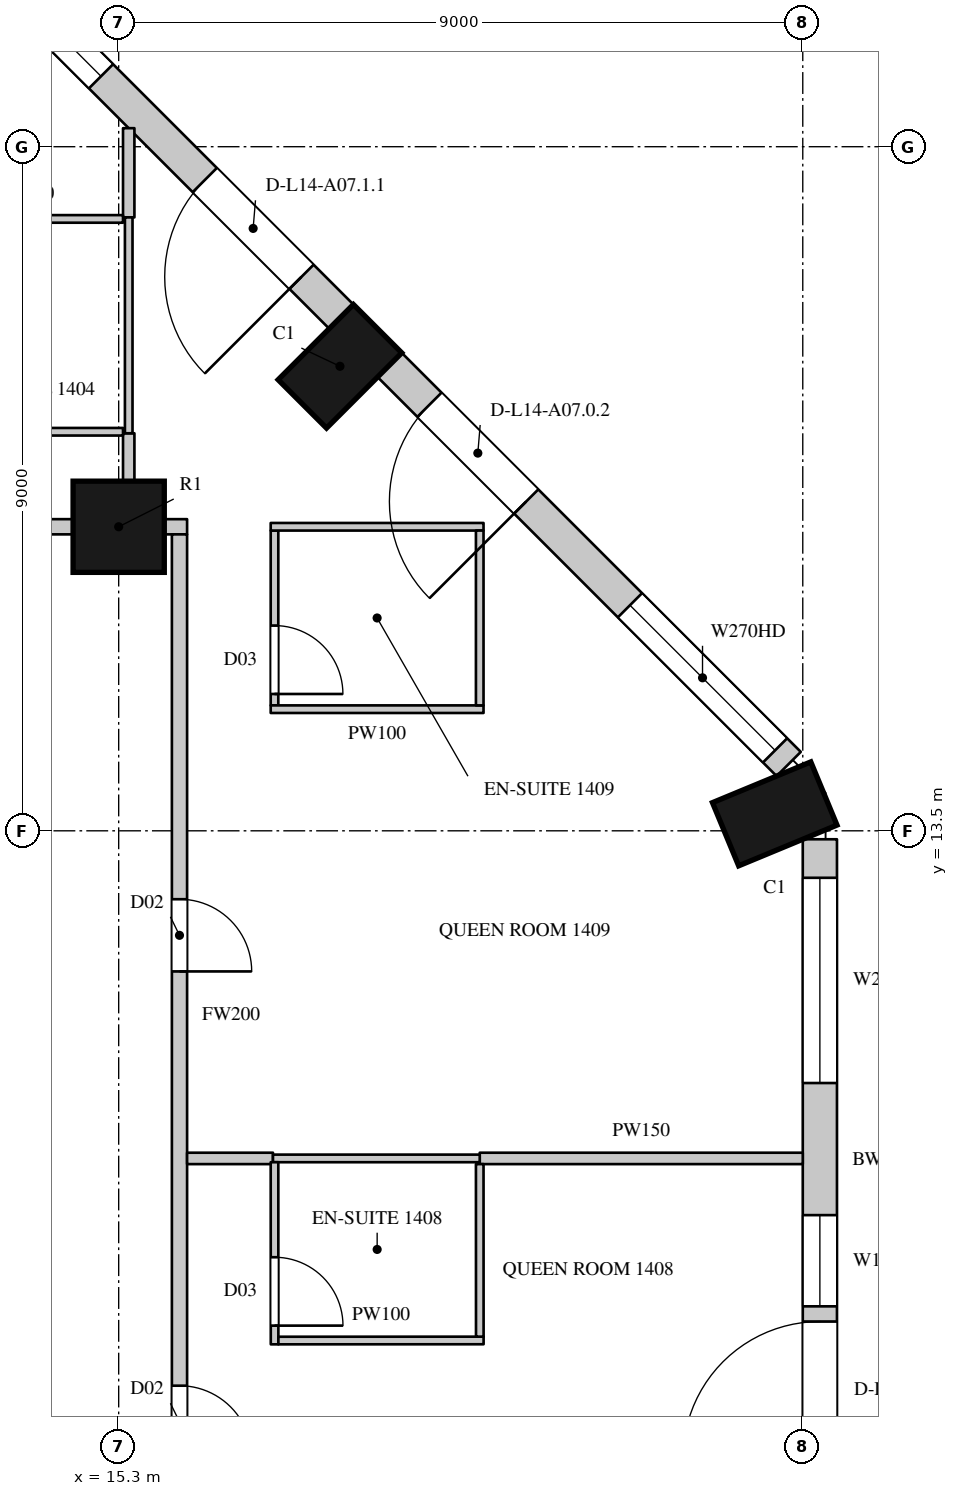
"""IFC4 building model, lengths in metres.
Left out: names, types, materials, properties, quantities, classifications, styles, units other than length and angle.
Written with IfcOpenShell. Run it as: python <this file> out.ifc"""

import sys

from ifc_helpers import new_model, si_unit, direction, frame, frame_2d, origin, origin_2d, place, context, subcontext, project, spatial, rectangle, circle, extrude, element, fill, save


model = new_model("IFC4")
c1 = context("Model", 3, precision=1e-05, world=origin(), true_north=direction((0.0, 1.0)))
c2 = subcontext(c1, "Body", "Model", "MODEL_VIEW")
j1 = project(units=[si_unit("LENGTHUNIT", "METRE"), si_unit("PLANEANGLEUNIT", "RADIAN")], contexts=[c1])
p1 = place(None, origin())
s1 = spatial("IfcSite", under=j1, at=p1, CompositionType="ELEMENT")
p2 = place(p1, origin())
s2 = spatial("IfcBuilding", under=s1, at=p2, CompositionType="ELEMENT")
p3 = place(p2, frame((0.0, 0.0, 80.7)))
s3 = spatial("IfcBuildingStorey", under=s2, at=p3, CompositionType="ELEMENT", Elevation=80.7)
for number, where, z_axis, x_axis in (
    (1, (23.931, 13.723, 0.0), (0.0, 0.0, 1.0), (-0.383, 0.924, 0.0)),
    (2, (18.211, 19.611, 0.0), (0.0, 0.0, 1.0), (-0.707, 0.707, 0.0)),
):
    element("IfcColumn", number, at=place(p3, frame(where, z_axis=z_axis, x_axis=x_axis)), inside=s3, PredefinedType="COLUMN", context=c2, shape_type="SweptSolid", body=[
        extrude(rectangle(XDim=0.9, YDim=1.4, at=origin_2d()), origin(), (0.0, 0.0, 1.0), 3.6),
    ])
p4 = place(p3, frame((15.3, 17.5, 0.0), z_axis=(0.0, 0.0, 1.0), x_axis=(1.0, 0.0, 0.0)))
e3 = element("IfcColumn", 3, at=p4, inside=s3, PredefinedType="COLUMN", context=c2, shape_type="SweptSolid", body=[
    extrude(circle(Radius=0.6, at=origin_2d()), origin(), (0.0, 0.0, 1.0), 3.6),
])
p5 = place(p3, frame((24.525, 4.95, 0.0), z_axis=(0.0, 0.0, 1.0), x_axis=(0.0, 1.0, 0.0)))
e4 = element("IfcWall", 4, at=p5, inside=s3, PredefinedType="SOLIDWALL", context=c2, shape_type="SweptSolid", body=[
    extrude(rectangle(XDim=8.439, YDim=0.45, at=frame_2d((4.219, 0.0))), origin(), (0.0, 0.0, 1.0), 3.3),
])
p6 = place(p5, frame((0.294, 0.0, 0.0)))
e5 = element("IfcOpeningElement", 5, at=p6, cuts=e4, PredefinedType="OPENING", context=c2, shape_type="SweptSolid", body=[
    extrude(rectangle(XDim=1.8, YDim=2.4, at=frame_2d((0.9, 1.2))), frame((0.0, 0.235, 0.0), z_axis=(0.0, -1.0, 0.0), x_axis=(1.0, 0.0, 0.0)), (0.0, 0.0, 1.0), 0.47),
])
p7 = place(p5, frame((2.294, 0.0, 1.05)))
e6 = element("IfcOpeningElement", 6, at=p7, cuts=e4, PredefinedType="OPENING", context=c2, shape_type="SweptSolid", body=[
    extrude(rectangle(XDim=1.2, YDim=2.0, at=frame_2d((0.6, 1.0))), frame((0.0, 0.235, 0.0), z_axis=(0.0, -1.0, 0.0), x_axis=(1.0, 0.0, 0.0)), (0.0, 0.0, 1.0), 0.47),
])
p8 = place(p5, frame((5.232, 0.0, 1.05)))
e7 = element("IfcOpeningElement", 7, at=p8, cuts=e4, PredefinedType="OPENING", context=c2, shape_type="SweptSolid", body=[
    extrude(rectangle(XDim=2.7, YDim=2.0, at=frame_2d((1.35, 1.0))), frame((0.0, 0.235, 0.0), z_axis=(0.0, -1.0, 0.0), x_axis=(1.0, 0.0, 0.0)), (0.0, 0.0, 1.0), 0.47),
])
p9 = place(p3, frame((24.115, 14.379, 0.0), z_axis=(0.0, 0.0, 1.0), x_axis=(-0.707106781187, 0.707106781187, 0.0)))
e8 = element("IfcWall", 8, at=p9, inside=s3, PredefinedType="SOLIDWALL", context=c2, shape_type="SweptSolid", body=[
    extrude(rectangle(XDim=7.424, YDim=0.45, at=frame_2d((3.712, 0.0))), origin(), (0.0, 0.0, 1.0), 3.3),
])
p10 = place(p9, frame((0.253, 0.0, 1.05)))
e9 = element("IfcOpeningElement", 9, at=p10, cuts=e8, PredefinedType="OPENING", context=c2, shape_type="SweptSolid", body=[
    extrude(rectangle(XDim=2.7, YDim=2.0, at=frame_2d((1.35, 1.0))), frame((0.0, 0.235, 0.0), z_axis=(0.0, -1.0, 0.0), x_axis=(1.0, 0.0, 0.0)), (0.0, 0.0, 1.0), 0.47),
])
p11 = place(p9, frame((4.884, 0.0, 0.0)))
e10 = element("IfcOpeningElement", 10, at=p11, cuts=e8, PredefinedType="OPENING", context=c2, shape_type="SweptSolid", body=[
    extrude(rectangle(XDim=1.8, YDim=2.4, at=frame_2d((0.9, 1.2))), frame((0.0, 0.235, 0.0), z_axis=(0.0, -1.0, 0.0), x_axis=(1.0, 0.0, 0.0)), (0.0, 0.0, 1.0), 0.47),
])
p12 = place(p3, frame((18.229, 20.265, 0.0), z_axis=(0.0, 0.0, 1.0), x_axis=(-0.707106781187, 0.707106781187, 0.0)))
e11 = element("IfcWall", 11, at=p12, inside=s3, PredefinedType="SOLIDWALL", context=c2, shape_type="SweptSolid", body=[
    extrude(rectangle(XDim=7.424, YDim=0.45, at=frame_2d((3.712, 0.0))), origin(), (0.0, 0.0, 1.0), 3.3),
])
p13 = place(p12, frame((0.74, 0.0, 0.0)))
e12 = element("IfcOpeningElement", 12, at=p13, cuts=e11, PredefinedType="OPENING", context=c2, shape_type="SweptSolid", body=[
    extrude(rectangle(XDim=1.8, YDim=2.4, at=frame_2d((0.9, 1.2))), frame((0.0, 0.235, 0.0), z_axis=(0.0, -1.0, 0.0), x_axis=(1.0, 0.0, 0.0)), (0.0, 0.0, 1.0), 0.47),
])
p14 = place(p12, frame((4.471, 0.0, 1.05)))
e13 = element("IfcOpeningElement", 13, at=p14, cuts=e11, PredefinedType="OPENING", context=c2, shape_type="SweptSolid", body=[
    extrude(rectangle(XDim=2.7, YDim=2.0, at=frame_2d((1.35, 1.0))), frame((0.0, 0.235, 0.0), z_axis=(0.0, -1.0, 0.0), x_axis=(1.0, 0.0, 0.0)), (0.0, 0.0, 1.0), 0.47),
])
p15 = place(p3, frame((23.15, 16.864, 0.0), z_axis=(0.0, 0.0, 1.0), x_axis=(-0.707106781187, 0.707106781187, 0.0)))
e14 = element("IfcWall", 14, at=p15, inside=s3, PredefinedType="SOLIDWALL", context=c2, shape_type="SweptSolid", body=[
    extrude(rectangle(XDim=1.445, YDim=0.45, at=frame_2d((0.722, 0.0))), origin(), (0.0, 0.0, 1.0), 0.6),
])
p16 = place(p3, frame((19.937, 20.078, 0.0), z_axis=(0.0, 0.0, 1.0), x_axis=(-0.707106781187, 0.707106781187, 0.0)))
e15 = element("IfcWall", 15, at=p16, inside=s3, PredefinedType="SOLIDWALL", context=c2, shape_type="SweptSolid", body=[
    extrude(rectangle(XDim=1.781, YDim=0.45, at=frame_2d((0.89, 0.0))), origin(), (0.0, 0.0, 1.0), 0.6),
])
p17 = place(p3, frame((16.486, 23.529, 0.0), z_axis=(0.0, 0.0, 1.0), x_axis=(-0.707022305137, 0.707191247145, 0.0)))
e16 = element("IfcWall", 16, at=p17, inside=s3, PredefinedType="SOLIDWALL", context=c2, shape_type="SweptSolid", body=[
    extrude(rectangle(XDim=1.445, YDim=0.45, at=frame_2d((0.723, 0.0))), origin(), (0.0, 0.0, 1.0), 0.6),
])
p18 = place(p3, frame((6.9, 17.5, 0.0), z_axis=(0.0, 0.0, 1.0), x_axis=(1.0, 0.0, 0.0)))
e17 = element("IfcWall", 17, at=p18, inside=s3, PredefinedType="PARTITIONING", context=c2, shape_type="SweptSolid", body=[
    extrude(rectangle(XDim=7.8, YDim=0.2, at=frame_2d((3.9, 0.0))), origin(), (0.0, 0.0, 1.0), 2.75),
])
p19 = place(p18, frame((1.45, 0.0, 0.0)))
e18 = element("IfcOpeningElement", 18, at=p19, cuts=e17, PredefinedType="OPENING", context=c2, shape_type="SweptSolid", body=[
    extrude(rectangle(XDim=1.1, YDim=2.4, at=frame_2d((0.55, 1.2))), frame((0.0, 0.11, 0.0), z_axis=(0.0, -1.0, 0.0), x_axis=(1.0, 0.0, 0.0)), (0.0, 0.0, 1.0), 0.22),
])
p20 = place(p3, frame((15.9, 17.5, 0.0), z_axis=(0.0, 0.0, 1.0), x_axis=(1.0, 0.0, 0.0)))
e19 = element("IfcWall", 19, at=p20, inside=s3, PredefinedType="PARTITIONING", context=c2, shape_type="SweptSolid", body=[
    extrude(rectangle(XDim=0.3, YDim=0.2, at=frame_2d((0.15, 0.0))), origin(), (0.0, 0.0, 1.0), 3.3),
])
p21 = place(p3, frame((16.1, 4.75, 0.0), z_axis=(0.0, 0.0, 1.0), x_axis=(0.0, 1.0, 0.0)))
e20 = element("IfcWall", 20, at=p21, inside=s3, PredefinedType="PARTITIONING", context=c2, shape_type="SweptSolid", body=[
    extrude(rectangle(XDim=12.65, YDim=0.2, at=frame_2d((6.325, 0.0))), origin(), (0.0, 0.0, 1.0), 3.3),
])
p22 = place(p21, frame((0.5, 0.0, 0.0)))
e21 = element("IfcOpeningElement", 21, at=p22, cuts=e20, PredefinedType="OPENING", context=c2, shape_type="SweptSolid", body=[
    extrude(rectangle(XDim=0.95, YDim=2.2, at=frame_2d((0.475, 1.1))), frame((0.0, 0.11, 0.0), z_axis=(0.0, -1.0, 0.0), x_axis=(1.0, 0.0, 0.0)), (0.0, 0.0, 1.0), 0.22),
])
p23 = place(p21, frame((6.9, 0.0, 0.0)))
e22 = element("IfcOpeningElement", 22, at=p23, cuts=e20, PredefinedType="OPENING", context=c2, shape_type="SweptSolid", body=[
    extrude(rectangle(XDim=0.95, YDim=2.2, at=frame_2d((0.475, 1.1))), frame((0.0, 0.11, 0.0), z_axis=(0.0, -1.0, 0.0), x_axis=(1.0, 0.0, 0.0)), (0.0, 0.0, 1.0), 0.22),
])
p24 = place(p3, frame((15.432, 18.094, 0.0), z_axis=(0.0, 0.0, 1.0), x_axis=(0.0, 1.0, 0.0)))
e23 = element("IfcWall", 23, at=p24, inside=s3, PredefinedType="PARTITIONING", context=c2, shape_type="SweptSolid", body=[
    extrude(rectangle(XDim=0.636, YDim=0.15, at=frame_2d((0.318, 0.0))), origin(), (0.0, 0.0, 1.0), 3.3),
])
p25 = place(p3, frame((15.432, 21.57, 0.0), z_axis=(0.0, 0.0, 1.0), x_axis=(0.0, 1.0, 0.0)))
e24 = element("IfcWall", 24, at=p25, inside=s3, PredefinedType="PARTITIONING", context=c2, shape_type="SweptSolid", body=[
    extrude(rectangle(XDim=1.174, YDim=0.15, at=frame_2d((0.587, 0.0))), origin(), (0.0, 0.0, 1.0), 3.3),
])
p26 = place(p3, frame((16.2, 9.19, 0.0), z_axis=(0.0, 0.0, 1.0), x_axis=(1.0, 0.0, 0.0)))
e25 = element("IfcWall", 25, at=p26, inside=s3, PredefinedType="PARTITIONING", context=c2, shape_type="SweptSolid", body=[
    extrude(rectangle(XDim=1.13, YDim=0.15, at=frame_2d((0.565, 0.0))), origin(), (0.0, 0.0, 1.0), 2.65),
])
p27 = place(p3, frame((20.05, 9.19, 0.0), z_axis=(0.0, 0.0, 1.0), x_axis=(1.0, 0.0, 0.0)))
e26 = element("IfcWall", 26, at=p27, inside=s3, PredefinedType="PARTITIONING", context=c2, shape_type="SweptSolid", body=[
    extrude(rectangle(XDim=4.25, YDim=0.15, at=frame_2d((2.125, 0.0))), origin(), (0.0, 0.0, 1.0), 2.65),
])
for number, where, z_axis, x_axis in (
    (27, (12.786, 18.75, 0.0), (0.0, 0.0, 1.0), (1.0, 0.0, 0.0)),
    (28, (12.786, 21.55, 0.0), (0.0, 0.0, 1.0), (1.0, 0.0, 0.0)),
):
    element("IfcWall", number, at=place(p3, frame(where, z_axis=z_axis, x_axis=x_axis)), inside=s3, PredefinedType="PARTITIONING", context=c2, shape_type="SweptSolid", body=[
        extrude(rectangle(XDim=2.571, YDim=0.1, at=frame_2d((1.286, 0.0))), origin(), (0.0, 0.0, 1.0), 3.3),
    ])
p28 = place(p3, frame((15.432, 18.73, 0.0), z_axis=(0.0, 0.0, 1.0), x_axis=(0.0, 1.0, 0.0)))
e29 = element("IfcWall", 29, at=p28, inside=s3, PredefinedType="PARTITIONING", context=c2, shape_type="SweptSolid", body=[
    extrude(rectangle(XDim=2.84, YDim=0.1, at=frame_2d((1.42, 0.0))), origin(), (0.0, 0.0, 1.0), 3.3),
])
p29 = place(p3, frame((17.33, 9.19, 0.0), z_axis=(0.0, 0.0, 1.0), x_axis=(1.0, 0.0, 0.0)))
e30 = element("IfcWall", 30, at=p29, inside=s3, PredefinedType="PARTITIONING", context=c2, shape_type="SweptSolid", body=[
    extrude(rectangle(XDim=2.72, YDim=0.1, at=frame_2d((1.36, 0.0))), origin(), (0.0, 0.0, 1.0), 2.65),
])
p30 = place(p3, frame((17.35, 9.14, 0.0), z_axis=(0.0, 0.0, 1.0), x_axis=(0.000407580973, -0.999999916939, 0.0)))
e31 = element("IfcWall", 31, at=p30, inside=s3, PredefinedType="PARTITIONING", context=c2, shape_type="SweptSolid", body=[
    extrude(rectangle(XDim=2.396, YDim=0.1, at=frame_2d((1.198, 0.0))), origin(), (0.0, 0.0, 1.0), 3.3),
])
p31 = place(p30, frame((1.25, 0.0, 0.0)))
e32 = element("IfcOpeningElement", 32, at=p31, cuts=e31, PredefinedType="OPENING", context=c2, shape_type="SweptSolid", body=[
    extrude(rectangle(XDim=0.9, YDim=2.2, at=frame_2d((0.45, 1.1))), frame((0.0, 0.06, 0.0), z_axis=(0.0, -1.0, 0.0), x_axis=(1.0, 0.0, 0.0)), (0.0, 0.0, 1.0), 0.12),
])
p32 = place(p3, frame((17.35, 15.15, 0.0), z_axis=(0.0, 0.0, 1.0), x_axis=(0.0, 1.0, 0.0)))
e33 = element("IfcWall", 33, at=p32, inside=s3, PredefinedType="PARTITIONING", context=c2, shape_type="SweptSolid", body=[
    extrude(rectangle(XDim=2.3, YDim=0.1, at=frame_2d((1.15, 0.0))), origin(), (0.0, 0.0, 1.0), 3.3),
])
p33 = place(p32, frame((0.15, 0.0, 0.0)))
e34 = element("IfcOpeningElement", 34, at=p33, cuts=e33, PredefinedType="OPENING", context=c2, shape_type="SweptSolid", body=[
    extrude(rectangle(XDim=0.9, YDim=2.2, at=frame_2d((0.45, 1.1))), frame((0.0, 0.06, 0.0), z_axis=(0.0, -1.0, 0.0), x_axis=(1.0, 0.0, 0.0)), (0.0, 0.0, 1.0), 0.12),
])
for number, where, z_axis, x_axis in (
    (35, (17.3, 15.1, 0.0), (0.0, 0.0, 1.0), (1.0, 0.0, 0.0)),
    (36, (17.3, 17.5, 0.0), (0.0, 0.0, 1.0), (1.0, 0.0, 0.0)),
):
    element("IfcWall", number, at=place(p3, frame(where, z_axis=z_axis, x_axis=x_axis)), inside=s3, PredefinedType="PARTITIONING", context=c2, shape_type="SweptSolid", body=[
        extrude(rectangle(XDim=2.8, YDim=0.1, at=frame_2d((1.4, 0.0))), origin(), (0.0, 0.0, 1.0), 3.3),
    ])
p34 = place(p3, frame((17.401, 6.794, 0.0), z_axis=(0.0, 0.0, 1.0), x_axis=(0.9999999346, 0.000361663629, 0.0)))
e37 = element("IfcWall", 37, at=p34, inside=s3, PredefinedType="PARTITIONING", context=c2, shape_type="SweptSolid", body=[
    extrude(rectangle(XDim=2.7, YDim=0.1, at=frame_2d((1.35, 0.0))), origin(), (0.0, 0.0, 1.0), 3.3),
])
p35 = place(p3, frame((20.05, 9.115, 0.0), z_axis=(0.0, 0.0, 1.0), x_axis=(0.000430200003, -0.999999907464, 0.0)))
e38 = element("IfcWall", 38, at=p35, inside=s3, PredefinedType="PARTITIONING", context=c2, shape_type="SweptSolid", body=[
    extrude(rectangle(XDim=2.27, YDim=0.1, at=frame_2d((1.135, 0.0))), origin(), (0.0, 0.0, 1.0), 3.3),
])
p36 = place(p3, frame((20.05, 15.15, 0.0), z_axis=(0.0, 0.0, 1.0), x_axis=(0.0, 1.0, 0.0)))
e39 = element("IfcWall", 39, at=p36, inside=s3, PredefinedType="PARTITIONING", context=c2, shape_type="SweptSolid", body=[
    extrude(rectangle(XDim=2.3, YDim=0.1, at=frame_2d((1.15, 0.0))), origin(), (0.0, 0.0, 1.0), 3.3),
])
p37 = place(p6, origin())
e40 = element("IfcDoor", 40, at=p37, inside=s3, OperationType="SLIDING_TO_LEFT", PredefinedType="DOOR", context=c2, shape_type="SweptSolid", body=[
    extrude(rectangle(XDim=1.8, YDim=2.4, at=frame_2d((0.9, 1.2))), frame((0.0, 0.13, 0.0), z_axis=(0.0, -1.0, 0.0), x_axis=(1.0, 0.0, 0.0)), (0.0, 0.0, 1.0), 0.05),
])
fill(e5, e40)
p38 = place(p7, origin())
e41 = element("IfcWindow", 41, at=p38, inside=s3, PartitioningType="SINGLE_PANEL", PredefinedType="WINDOW", context=c2, shape_type="SweptSolid", body=[
    extrude(rectangle(XDim=1.2, YDim=2.0, at=frame_2d((0.6, 1.0))), frame((0.0, 0.135, 0.0), z_axis=(0.0, -1.0, 0.0), x_axis=(1.0, 0.0, 0.0)), (0.0, 0.0, 1.0), 0.06),
])
fill(e6, e41)
p39 = place(p8, origin())
e42 = element("IfcWindow", 42, at=p39, inside=s3, PartitioningType="SINGLE_PANEL", PredefinedType="WINDOW", context=c2, shape_type="SweptSolid", body=[
    extrude(rectangle(XDim=2.7, YDim=2.0, at=frame_2d((1.35, 1.0))), frame((0.0, 0.135, 0.0), z_axis=(0.0, -1.0, 0.0), x_axis=(1.0, 0.0, 0.0)), (0.0, 0.0, 1.0), 0.06),
])
fill(e7, e42)
p40 = place(p10, origin())
e43 = element("IfcWindow", 43, at=p40, inside=s3, PartitioningType="SINGLE_PANEL", PredefinedType="WINDOW", context=c2, shape_type="SweptSolid", body=[
    extrude(rectangle(XDim=2.7, YDim=2.0, at=frame_2d((1.35, 1.0))), frame((0.0, 0.135, 0.0), z_axis=(0.0, -1.0, 0.0), x_axis=(1.0, 0.0, 0.0)), (0.0, 0.0, 1.0), 0.06),
])
fill(e9, e43)
p41 = place(p11, origin())
e44 = element("IfcDoor", 44, at=p41, inside=s3, OperationType="SLIDING_TO_LEFT", PredefinedType="DOOR", context=c2, shape_type="SweptSolid", body=[
    extrude(rectangle(XDim=1.8, YDim=2.4, at=frame_2d((0.9, 1.2))), frame((0.0, 0.13, 0.0), z_axis=(0.0, -1.0, 0.0), x_axis=(1.0, 0.0, 0.0)), (0.0, 0.0, 1.0), 0.05),
])
fill(e10, e44)
p42 = place(p13, origin())
e45 = element("IfcDoor", 45, at=p42, inside=s3, OperationType="SLIDING_TO_LEFT", PredefinedType="DOOR", context=c2, shape_type="SweptSolid", body=[
    extrude(rectangle(XDim=1.8, YDim=2.4, at=frame_2d((0.9, 1.2))), frame((0.0, 0.13, 0.0), z_axis=(0.0, -1.0, 0.0), x_axis=(1.0, 0.0, 0.0)), (0.0, 0.0, 1.0), 0.05),
])
fill(e12, e45)
p43 = place(p14, origin())
e46 = element("IfcWindow", 46, at=p43, inside=s3, PartitioningType="SINGLE_PANEL", PredefinedType="WINDOW", context=c2, shape_type="SweptSolid", body=[
    extrude(rectangle(XDim=2.7, YDim=2.0, at=frame_2d((1.35, 1.0))), frame((0.0, 0.135, 0.0), z_axis=(0.0, -1.0, 0.0), x_axis=(1.0, 0.0, 0.0)), (0.0, 0.0, 1.0), 0.06),
])
fill(e13, e46)
p44 = place(p22, origin())
e47 = element("IfcDoor", 47, at=p44, inside=s3, OperationType="SINGLE_SWING_RIGHT", PredefinedType="DOOR", context=c2, shape_type="SweptSolid", body=[
    extrude(rectangle(XDim=0.95, YDim=2.2, at=frame_2d((0.475, 1.1))), frame((0.0, 0.025, 0.0), z_axis=(0.0, -1.0, 0.0), x_axis=(1.0, 0.0, 0.0)), (0.0, 0.0, 1.0), 0.05),
])
fill(e21, e47)
p45 = place(p31, origin())
e48 = element("IfcDoor", 48, at=p45, inside=s3, OperationType="SINGLE_SWING_RIGHT", PredefinedType="DOOR", context=c2, shape_type="SweptSolid", body=[
    extrude(rectangle(XDim=0.9, YDim=2.2, at=frame_2d((0.45, 1.1))), frame((0.0, 0.025, 0.0), z_axis=(0.0, -1.0, 0.0), x_axis=(1.0, 0.0, 0.0)), (0.0, 0.0, 1.0), 0.05),
])
fill(e32, e48)
p46 = place(p23, origin())
e49 = element("IfcDoor", 49, at=p46, inside=s3, OperationType="SINGLE_SWING_RIGHT", PredefinedType="DOOR", context=c2, shape_type="SweptSolid", body=[
    extrude(rectangle(XDim=0.95, YDim=2.2, at=frame_2d((0.475, 1.1))), frame((0.0, 0.025, 0.0), z_axis=(0.0, -1.0, 0.0), x_axis=(1.0, 0.0, 0.0)), (0.0, 0.0, 1.0), 0.05),
])
fill(e22, e49)
p47 = place(p33, origin())
e50 = element("IfcDoor", 50, at=p47, inside=s3, OperationType="SINGLE_SWING_RIGHT", PredefinedType="DOOR", context=c2, shape_type="SweptSolid", body=[
    extrude(rectangle(XDim=0.9, YDim=2.2, at=frame_2d((0.45, 1.1))), frame((0.0, 0.025, 0.0), z_axis=(0.0, -1.0, 0.0), x_axis=(1.0, 0.0, 0.0)), (0.0, 0.0, 1.0), 0.05),
])
fill(e34, e50)
save(model, sys.argv[1])
